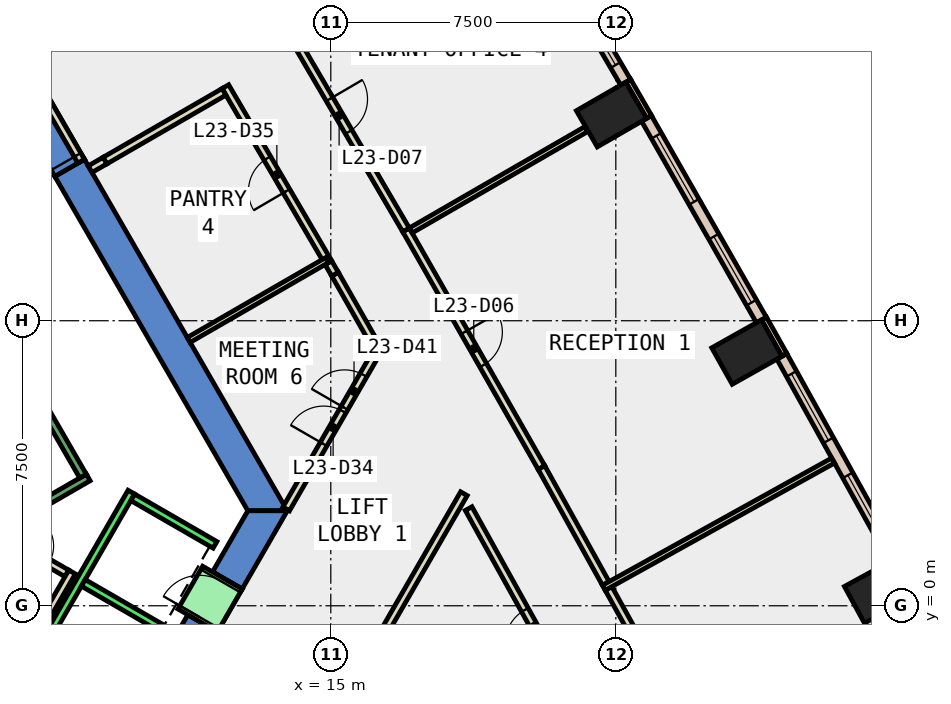
"""IFC4 building model, lengths in metres.
Left out: names, types, materials, properties, quantities, classifications, styles, units other than length and angle.
Written with IfcOpenShell. Run it as: python <this file> out.ifc"""

import sys

from ifc_helpers import new_model, si_unit, direction, frame, frame_2d, origin, origin_2d, place, context, subcontext, project, spatial, polyline, rectangle, outline, extrude, element, fill, save


model = new_model("IFC4")
c1 = context("Model", 3, precision=1e-05, world=origin(), true_north=direction((0.0, 1.0)))
c2 = subcontext(c1, "Body", "Model", "MODEL_VIEW")
j1 = project(units=[si_unit("LENGTHUNIT", "METRE"), si_unit("PLANEANGLEUNIT", "RADIAN")], contexts=[c1])
p1 = place(None, origin())
s1 = spatial("IfcSite", under=j1, at=p1, CompositionType="ELEMENT")
p2 = place(p1, origin())
s2 = spatial("IfcBuilding", under=s1, at=p2, CompositionType="ELEMENT")
p3 = place(p2, frame((0.0, 0.0, 107.6)))
s3 = spatial("IfcBuildingStorey", under=s2, at=p3, CompositionType="ELEMENT", Elevation=107.6)
for number, where, z_axis, x_axis in (
    (1, (29.438, 0.385, -0.4), (0.0, 0.0, 1.0), (-0.48, 0.877, 0.0)),
    (2, (25.948, 6.675, -0.4), (0.0, 0.0, 1.0), (-0.49, 0.872, 0.0)),
    (3, (22.387, 12.925, -0.4), (0.0, 0.0, 1.0), (-0.5, 0.866, 0.0)),
):
    element("IfcColumn", number, at=place(p3, frame(where, z_axis=z_axis, x_axis=x_axis)), inside=s3, PredefinedType="COLUMN", context=c2, shape_type="SweptSolid", body=[
        extrude(rectangle(XDim=1.1, YDim=1.5, at=origin_2d()), origin(), (0.0, 0.0, 1.0), 4.2),
    ])
p4 = place(p3, frame((0.0, 0.0, -0.4)))
e4 = element("IfcWall", 4, at=p4, inside=s3, PredefinedType="SHEAR", context=c2, shape_type="SweptSolid", body=[
    extrude(outline(polyline([(8.517, 11.748), (7.738, 11.298), (12.817, 2.5), (13.856, 2.5), (8.517, 11.748)])), origin(), (0.0, 0.0, 1.0), 4.2),
])
p5 = place(p3, frame((0.0, 0.0, 3.6)))
e5 = element("IfcWall", 5, at=p5, inside=s3, PredefinedType="SHEAR", context=c2, shape_type="SweptSolid", body=[
    extrude(outline(polyline([(7.517, 13.48), (6.738, 13.03), (7.738, 11.298), (8.517, 11.748), (7.517, 13.48)])), origin(), (0.0, 0.0, 1.0), 0.2),
])
p6 = place(p3, frame((0.0, 0.0, -0.4)))
e6 = element("IfcWall", 6, at=p6, inside=s3, PredefinedType="SHEAR", context=c2, shape_type="SweptSolid", body=[
    extrude(outline(polyline([(12.017, -0.686), (11.238, -0.236), (10.588, -1.361), (11.367, -1.811), (12.017, -0.686)])), origin(), (0.0, 0.0, 1.0), 4.2),
])
p7 = place(p3, frame((0.0, 0.0, -0.4)))
e7 = element("IfcWall", 7, at=p7, inside=s3, PredefinedType="SHEAR", context=c2, shape_type="SweptSolid", body=[
    extrude(outline(polyline([(11.888, 0.89), (12.667, 0.44), (13.856, 2.5), (12.817, 2.5), (11.888, 0.89)])), origin(), (0.0, 0.0, 1.0), 4.2),
])
p8 = place(p3, frame((0.0, 0.0, 3.6)))
e8 = element("IfcWall", 8, at=p8, inside=s3, PredefinedType="SHEAR", context=c2, shape_type="SweptSolid", body=[
    extrude(outline(polyline([(12.667, 0.44), (11.888, 0.89), (11.238, -0.236), (12.017, -0.686), (12.667, 0.44)])), origin(), (0.0, 0.0, 1.0), 0.2),
])
p9 = place(p3, frame((26.937, 6.6, 0.0), z_axis=(0.0, 0.0, 1.0), x_axis=(-0.490008344094, 0.871717742574, 0.0)))
e9 = element("IfcWall", 9, at=p9, inside=s3, PredefinedType="STANDARD", context=c2, shape_type="SweptSolid", body=[
    extrude(rectangle(XDim=1.1, YDim=0.15, at=frame_2d((0.55, 0.0))), origin(), (0.0, 0.0, 1.0), 3.8),
])
p10 = place(p3, frame((23.376, 12.861, 0.0), z_axis=(0.0, 0.0, 1.0), x_axis=(-0.499933745558, 0.866063652425, 0.0)))
e10 = element("IfcWall", 10, at=p10, inside=s3, PredefinedType="STANDARD", context=c2, shape_type="SweptSolid", body=[
    extrude(rectangle(XDim=1.1, YDim=0.15, at=frame_2d((0.55, 0.0))), origin(), (0.0, 0.0, 1.0), 3.8),
])
p11 = place(p3, frame((29.83, 1.225, 0.0), z_axis=(0.0, 0.0, 1.0), x_axis=(-0.485170774404, 0.874419418623, 0.0)))
e11 = element("IfcWall", 11, at=p11, inside=s3, PredefinedType="STANDARD", context=c2, shape_type="SweptSolid", body=[
    extrude(rectangle(XDim=6.103, YDim=0.3, at=frame_2d((3.052, 0.0))), origin(), (0.0, 0.0, 1.0), 3.8),
])
p12 = place(p11, frame((0.526, 0.0, 0.9)))
e12 = element("IfcOpeningElement", 12, at=p12, cuts=e11, PredefinedType="OPENING", context=c2, shape_type="SweptSolid", body=[
    extrude(rectangle(XDim=2.0, YDim=2.6, at=frame_2d((1.0, 1.3))), frame((0.0, 0.16, 0.0), z_axis=(0.0, -1.0, 0.0), x_axis=(1.0, 0.0, 0.0)), (0.0, 0.0, 1.0), 0.32),
])
p13 = place(p11, frame((3.578, 0.0, 0.9)))
e13 = element("IfcOpeningElement", 13, at=p13, cuts=e11, PredefinedType="OPENING", context=c2, shape_type="SweptSolid", body=[
    extrude(rectangle(XDim=2.0, YDim=2.6, at=frame_2d((1.0, 1.3))), frame((0.0, 0.16, 0.0), z_axis=(0.0, -1.0, 0.0), x_axis=(1.0, 0.0, 0.0)), (0.0, 0.0, 1.0), 0.32),
])
p14 = place(p3, frame((26.33, 7.52, 0.0), z_axis=(0.0, 0.0, 1.0), x_axis=(-0.495113375427, 0.868828375154, 0.0)))
e14 = element("IfcWall", 14, at=p14, inside=s3, PredefinedType="STANDARD", context=c2, shape_type="SweptSolid", body=[
    extrude(rectangle(XDim=6.104, YDim=0.3, at=frame_2d((3.052, 0.0))), origin(), (0.0, 0.0, 1.0), 3.8),
])
p15 = place(p14, frame((0.526, 0.0, 0.9)))
e15 = element("IfcOpeningElement", 15, at=p15, cuts=e14, PredefinedType="OPENING", context=c2, shape_type="SweptSolid", body=[
    extrude(rectangle(XDim=2.0, YDim=2.6, at=frame_2d((1.0, 1.3))), frame((0.0, 0.16, 0.0), z_axis=(0.0, -1.0, 0.0), x_axis=(1.0, 0.0, 0.0)), (0.0, 0.0, 1.0), 0.32),
])
p16 = place(p14, frame((3.578, 0.0, 0.9)))
e16 = element("IfcOpeningElement", 16, at=p16, cuts=e14, PredefinedType="OPENING", context=c2, shape_type="SweptSolid", body=[
    extrude(rectangle(XDim=2.0, YDim=2.6, at=frame_2d((1.0, 1.3))), frame((0.0, 0.16, 0.0), z_axis=(0.0, -1.0, 0.0), x_axis=(1.0, 0.0, 0.0)), (0.0, 0.0, 1.0), 0.32),
])
p17 = place(p3, frame((22.759, 13.774, 0.0), z_axis=(0.0, 0.0, 1.0), x_axis=(-0.50490018297, 0.863177736759, 0.0)))
e17 = element("IfcWall", 17, at=p17, inside=s3, PredefinedType="STANDARD", context=c2, shape_type="SweptSolid", body=[
    extrude(rectangle(XDim=6.104, YDim=0.3, at=frame_2d((3.052, 0.0))), origin(), (0.0, 0.0, 1.0), 3.8),
])
p18 = place(p17, frame((0.526, 0.0, 0.9)))
e18 = element("IfcOpeningElement", 18, at=p18, cuts=e17, PredefinedType="OPENING", context=c2, shape_type="SweptSolid", body=[
    extrude(rectangle(XDim=2.0, YDim=2.6, at=frame_2d((1.0, 1.3))), frame((0.0, 0.16, 0.0), z_axis=(0.0, -1.0, 0.0), x_axis=(1.0, 0.0, 0.0)), (0.0, 0.0, 1.0), 0.32),
])
p19 = place(p17, frame((3.578, 0.0, 0.9)))
e19 = element("IfcOpeningElement", 19, at=p19, cuts=e17, PredefinedType="OPENING", context=c2, shape_type="SweptSolid", body=[
    extrude(rectangle(XDim=2.0, YDim=2.6, at=frame_2d((1.0, 1.3))), frame((0.0, 0.16, 0.0), z_axis=(0.0, -1.0, 0.0), x_axis=(1.0, 0.0, 0.0)), (0.0, 0.0, 1.0), 0.32),
])
p20 = place(p3, frame((16.195, 6.824, 0.0), z_axis=(0.0, 0.0, 1.0), x_axis=(-0.494984897559, 0.868901577388, 0.0)))
e20 = element("IfcWall", 20, at=p20, inside=s3, PredefinedType="PARTITIONING", context=c2, shape_type="SweptSolid", body=[
    extrude(rectangle(XDim=2.188, YDim=0.2, at=frame_2d((1.094, 0.0))), origin(), (0.0, 0.0, 1.0), 3.8),
])
p21 = place(p3, frame((15.112, 8.725, 0.0), z_axis=(0.0, 0.0, 1.0), x_axis=(-0.50443330283, 0.86345066043, 0.0)))
e21 = element("IfcWall", 21, at=p21, inside=s3, PredefinedType="PARTITIONING", context=c2, shape_type="SweptSolid", body=[
    extrude(rectangle(XDim=0.351, YDim=0.2, at=frame_2d((0.175, 0.0))), origin(), (0.0, 0.0, 1.0), 3.8),
])
p22 = place(p3, frame((14.935, 9.028, 0.0), z_axis=(0.0, 0.0, 1.0), x_axis=(-0.504934493304, 0.863157666636, 0.0)))
e22 = element("IfcWall", 22, at=p22, inside=s3, PredefinedType="PARTITIONING", context=c2, shape_type="SweptSolid", body=[
    extrude(rectangle(XDim=5.365, YDim=0.2, at=frame_2d((2.683, 0.0))), origin(), (0.0, 0.0, 1.0), 3.8),
])
p23 = place(p22, frame((2.182, 0.0, 0.0)))
e23 = element("IfcOpeningElement", 23, at=p23, cuts=e22, PredefinedType="OPENING", context=c2, shape_type="SweptSolid", body=[
    extrude(rectangle(XDim=1.0, YDim=2.1, at=frame_2d((0.5, 1.05))), frame((0.0, 0.11, 0.0), z_axis=(0.0, -1.0, 0.0), x_axis=(1.0, 0.0, 0.0)), (0.0, 0.0, 1.0), 0.22),
])
p24 = place(p3, frame((12.19, 13.522, 0.0), z_axis=(0.0, 0.0, 1.0), x_axis=(-0.866000156139, -0.500043727655, 0.0)))
e24 = element("IfcWall", 24, at=p24, inside=s3, PredefinedType="PARTITIONING", context=c2, shape_type="SweptSolid", body=[
    extrude(rectangle(XDim=3.618, YDim=0.2, at=frame_2d((1.809, 0.0))), origin(), (0.0, 0.0, 1.0), 3.8),
])
p25 = place(p3, frame((22.071, -3.65, 0.0), z_axis=(0.0, 0.0, 1.0), x_axis=(-0.485198988697, 0.874403763354, 0.0)))
e25 = element("IfcWall", 25, at=p25, inside=s3, PredefinedType="PARTITIONING", context=c2, shape_type="SweptSolid", body=[
    extrude(rectangle(XDim=7.098, YDim=0.2, at=frame_2d((3.549, 0.0))), origin(), (0.0, 0.0, 1.0), 3.8),
])
p26 = place(p25, frame((3.049, 0.0, 0.0)))
e26 = element("IfcOpeningElement", 26, at=p26, cuts=e25, PredefinedType="OPENING", context=c2, shape_type="SweptSolid", body=[
    extrude(rectangle(XDim=1.0, YDim=2.1, at=frame_2d((0.5, 1.05))), frame((0.0, 0.11, 0.0), z_axis=(0.0, -1.0, 0.0), x_axis=(1.0, 0.0, 0.0)), (0.0, 0.0, 1.0), 0.22),
])
p27 = place(p3, frame((22.309, 0.456, 0.0), z_axis=(0.0, 0.0, 1.0), x_axis=(0.484982854201, -0.87452365956, 0.0)))
e27 = element("IfcWall", 27, at=p27, inside=s3, PredefinedType="PARTITIONING", context=c2, shape_type="SweptSolid", body=[
    extrude(rectangle(XDim=3.487, YDim=0.2, at=frame_2d((1.743, 0.0))), origin(), (0.0, 0.0, 1.0), 3.8),
])
p28 = place(p3, frame((16.98, 9.89, 0.0), z_axis=(0.0, 0.0, 1.0), x_axis=(0.495123170501, -0.868822793228, 0.0)))
e28 = element("IfcWall", 28, at=p28, inside=s3, PredefinedType="PARTITIONING", context=c2, shape_type="SweptSolid", body=[
    extrude(rectangle(XDim=7.198, YDim=0.2, at=frame_2d((3.599, 0.0))), origin(), (0.0, 0.0, 1.0), 3.8),
])
p29 = place(p28, frame((3.099, 0.0, 0.0)))
e29 = element("IfcOpeningElement", 29, at=p29, cuts=e28, PredefinedType="OPENING", context=c2, shape_type="SweptSolid", body=[
    extrude(rectangle(XDim=1.0, YDim=2.1, at=frame_2d((0.5, 1.05))), frame((0.0, 0.11, 0.0), z_axis=(0.0, -1.0, 0.0), x_axis=(1.0, 0.0, 0.0)), (0.0, 0.0, 1.0), 0.22),
])
p30 = place(p3, frame((20.544, 3.636, 0.0), z_axis=(0.0, 0.0, 1.0), x_axis=(0.485250552989, -0.874375148792, 0.0)))
e30 = element("IfcWall", 30, at=p30, inside=s3, PredefinedType="PARTITIONING", context=c2, shape_type="SweptSolid", body=[
    extrude(rectangle(XDim=3.487, YDim=0.2, at=frame_2d((1.744, 0.0))), origin(), (0.0, 0.0, 1.0), 3.8),
])
p31 = place(p3, frame((13.383, 16.039, 0.0), z_axis=(0.0, 0.0, 1.0), x_axis=(0.504806221623, -0.863232690884, 0.0)))
e31 = element("IfcWall", 31, at=p31, inside=s3, PredefinedType="PARTITIONING", context=c2, shape_type="SweptSolid", body=[
    extrude(rectangle(XDim=7.124, YDim=0.2, at=frame_2d((3.562, 0.0))), origin(), (0.0, 0.0, 1.0), 3.8),
])
p32 = place(p31, frame((3.137, 0.0, 0.0)))
e32 = element("IfcOpeningElement", 32, at=p32, cuts=e31, PredefinedType="OPENING", context=c2, shape_type="SweptSolid", body=[
    extrude(rectangle(XDim=1.0, YDim=2.1, at=frame_2d((0.5, 1.05))), frame((0.0, 0.11, 0.0), z_axis=(0.0, -1.0, 0.0), x_axis=(1.0, 0.0, 0.0)), (0.0, 0.0, 1.0), 0.22),
])
p33 = place(p3, frame((6.25, 1.894, 0.0), z_axis=(0.0, 0.0, 1.0), x_axis=(0.866043184279, -0.499969202016, 0.0)))
e33 = element("IfcWall", 33, at=p33, inside=s3, PredefinedType="PARTITIONING", context=c2, shape_type="SweptSolid", body=[
    extrude(rectangle(XDim=2.084, YDim=0.2, at=frame_2d((1.042, 0.0))), origin(), (0.0, 0.0, 1.0), 3.8),
])
p34 = place(p33, frame((0.642, 0.0, 0.0)))
e34 = element("IfcOpeningElement", 34, at=p34, cuts=e33, PredefinedType="OPENING", context=c2, shape_type="SweptSolid", body=[
    extrude(rectangle(XDim=0.9, YDim=2.1, at=frame_2d((0.45, 1.05))), frame((0.0, 0.11, 0.0), z_axis=(0.0, -1.0, 0.0), x_axis=(1.0, 0.0, 0.0)), (0.0, 0.0, 1.0), 0.22),
])
p35 = place(p3, frame((8.192, 0.888, 0.0), z_axis=(0.0, 0.0, 1.0), x_axis=(-0.499940625693, -0.866059680843, 0.0)))
e35 = element("IfcWall", 35, at=p35, inside=s3, PredefinedType="PARTITIONING", context=c2, shape_type="SweptSolid", body=[
    extrude(rectangle(XDim=2.68, YDim=0.2, at=frame_2d((1.34, 0.0))), origin(), (0.0, 0.0, 1.0), 3.8),
])
p36 = place(p3, frame((11.261, 6.994, 0.0), z_axis=(0.0, 0.0, 1.0), x_axis=(0.866037428454, 0.499979172084, 0.0)))
e36 = element("IfcWall", 36, at=p36, inside=s3, PredefinedType="PARTITIONING", context=c2, shape_type="SweptSolid", body=[
    extrude(rectangle(XDim=4.198, YDim=0.15, at=frame_2d((2.099, 0.0))), origin(), (0.0, 0.0, 1.0), 3.8),
])
p37 = place(p3, frame((13.827, 2.55, 0.0), z_axis=(0.0, 0.0, 1.0), x_axis=(0.500070719615, 0.865984569946, 0.0)))
e37 = element("IfcWall", 37, at=p37, inside=s3, PredefinedType="PARTITIONING", context=c2, shape_type="SweptSolid", body=[
    extrude(rectangle(XDim=4.935, YDim=0.2, at=frame_2d((2.468, 0.0))), origin(), (0.0, 0.0, 1.0), 3.8),
])
p38 = place(p37, frame((1.968, 0.0, 0.0)))
e38 = element("IfcOpeningElement", 38, at=p38, cuts=e37, PredefinedType="OPENING", context=c2, shape_type="SweptSolid", body=[
    extrude(rectangle(XDim=1.0, YDim=2.1, at=frame_2d((0.5, 1.05))), frame((0.0, 0.11, 0.0), z_axis=(0.0, -1.0, 0.0), x_axis=(1.0, 0.0, 0.0)), (0.0, 0.0, 1.0), 0.22),
])
p39 = place(p37, frame((3.068, 0.0, 0.0)))
e39 = element("IfcOpeningElement", 39, at=p39, cuts=e37, PredefinedType="OPENING", context=c2, shape_type="SweptSolid", body=[
    extrude(rectangle(XDim=1.0, YDim=2.1, at=frame_2d((0.5, 1.05))), frame((0.0, 0.11, 0.0), z_axis=(0.0, -1.0, 0.0), x_axis=(1.0, 0.0, 0.0)), (0.0, 0.0, 1.0), 0.22),
])
p40 = place(p3, frame((18.503, 2.949, 0.0), z_axis=(0.0, 0.0, 1.0), x_axis=(-0.49997390151, -0.86604047123, 0.0)))
e40 = element("IfcWall", 40, at=p40, inside=s3, PredefinedType="PARTITIONING", context=c2, shape_type="SweptSolid", body=[
    extrude(rectangle(XDim=11.626, YDim=0.2, at=frame_2d((5.813, 0.0))), origin(), (0.0, 0.0, 1.0), 3.8),
])
p41 = place(p3, frame((22.185, 0.473, 0.0), z_axis=(0.0, 0.0, 1.0), x_axis=(0.874372498137, 0.485255329184, 0.0)))
e41 = element("IfcWall", 41, at=p41, inside=s3, PredefinedType="PARTITIONING", context=c2, shape_type="SweptSolid", body=[
    extrude(rectangle(XDim=6.9, YDim=0.15, at=frame_2d((3.45, 0.0))), origin(), (0.0, 0.0, 1.0), 3.8),
])
p42 = place(p3, frame((17.104, 9.875, 0.0), z_axis=(0.0, 0.0, 1.0), x_axis=(0.866024640963, 0.500001321243, 0.0)))
e42 = element("IfcWall", 42, at=p42, inside=s3, PredefinedType="PARTITIONING", context=c2, shape_type="SweptSolid", body=[
    extrude(rectangle(XDim=5.33, YDim=0.15, at=frame_2d((2.665, 0.0))), origin(), (0.0, 0.0, 1.0), 3.8),
])
p43 = place(p3, frame((8.43, 11.698, 0.0), z_axis=(0.0, 0.0, 1.0), x_axis=(-0.50002537861, 0.866010750942, 0.0)))
e43 = element("IfcWall", 43, at=p43, inside=s3, PredefinedType="PARTITIONING", context=c2, shape_type="SweptSolid", body=[
    extrude(rectangle(XDim=2.0, YDim=0.2, at=frame_2d((1.0, 0.0))), origin(), (0.0, 0.0, 1.0), 2.4),
])
p44 = place(p43, frame((0.19, 0.0, 0.0)))
e44 = element("IfcOpeningElement", 44, at=p44, cuts=e43, PredefinedType="OPENING", context=c2, shape_type="SweptSolid", body=[
    extrude(rectangle(XDim=1.8, YDim=2.1, at=frame_2d((0.9, 1.05))), frame((0.0, 0.11, 0.0), z_axis=(0.0, -1.0, 0.0), x_axis=(1.0, 0.0, 0.0)), (0.0, 0.0, 1.0), 0.22),
])
p45 = place(p3, frame((9.057, 11.713, 0.0), z_axis=(0.0, 0.0, 1.0), x_axis=(-0.866266849364, -0.49958157061, 0.0)))
e45 = element("IfcWall", 45, at=p45, inside=s3, PredefinedType="PARTITIONING", context=c2, shape_type="SweptSolid", body=[
    extrude(rectangle(XDim=0.45, YDim=0.2, at=frame_2d((0.225, 0.0))), origin(), (0.0, 0.0, 1.0), 2.4),
])
p46 = place(p3, frame((4.451, -6.19, 0.0), z_axis=(0.0, 0.0, 1.0), x_axis=(0.50000090737, 0.866024879913, 0.0)))
e46 = element("IfcWall", 46, at=p46, inside=s3, PredefinedType="STANDARD", context=c2, shape_type="SweptSolid", body=[
    extrude(rectangle(XDim=10.6, YDim=0.2, at=frame_2d((5.3, 0.0))), origin(), (0.0, 0.0, 1.0), 3.8),
])
p47 = place(p3, frame((8.488, 0.602, 0.0), z_axis=(0.0, 0.0, 1.0), x_axis=(0.866022959057, -0.500004234368, 0.0)))
e47 = element("IfcWall", 47, at=p47, inside=s3, PredefinedType="STANDARD", context=c2, shape_type="SweptSolid", body=[
    extrude(rectangle(XDim=2.5, YDim=0.2, at=frame_2d((1.25, 0.0))), origin(), (0.0, 0.0, 1.0), 3.8),
])
p48 = place(p3, frame((9.788, 2.853, 0.0), z_axis=(0.0, 0.0, 1.0), x_axis=(0.865998541277, -0.500046524342, 0.0)))
e48 = element("IfcWall", 48, at=p48, inside=s3, PredefinedType="STANDARD", context=c2, shape_type="SweptSolid", body=[
    extrude(rectangle(XDim=2.5, YDim=0.2, at=frame_2d((1.25, 0.0))), origin(), (0.0, 0.0, 1.0), 3.8),
])
p49 = place(p3, frame((11.498, -0.385, 0.0), z_axis=(0.0, 0.0, 1.0), x_axis=(0.500221244143, 0.865897630733, 0.0)))
e49 = element("IfcWall", 49, at=p49, inside=s3, PredefinedType="STANDARD", context=c2, shape_type="SweptSolid", body=[
    extrude(rectangle(XDim=1.299, YDim=1.2, at=frame_2d((0.65, 0.0))), origin(), (0.0, 0.0, 1.0), 2.4),
])
p50 = place(p49, frame((0.1, 0.0, 0.0)))
e50 = element("IfcOpeningElement", 50, at=p50, cuts=e49, PredefinedType="OPENING", context=c2, shape_type="SweptSolid", body=[
    extrude(rectangle(XDim=1.1, YDim=2.3, at=frame_2d((0.55, 1.15))), frame((0.0, 0.61, 0.0), z_axis=(0.0, -1.0, 0.0), x_axis=(1.0, 0.0, 0.0)), (0.0, 0.0, 1.0), 1.22),
])
p51 = place(p3, frame((4.806, 1.176, 0.0), z_axis=(0.0, 0.0, 1.0), x_axis=(0.866059941101, 0.499940174841, 0.0)))
e51 = element("IfcWall", 51, at=p51, inside=s3, PredefinedType="STANDARD", context=c2, shape_type="SweptSolid", body=[
    extrude(rectangle(XDim=4.4, YDim=0.2, at=frame_2d((2.2, 0.0))), origin(), (0.0, 0.0, 1.0), 3.8),
])
p52 = place(p51, frame((1.65, 0.0, 0.0)))
e52 = element("IfcOpeningElement", 52, at=p52, cuts=e51, PredefinedType="OPENING", context=c2, shape_type="SweptSolid", body=[
    extrude(rectangle(XDim=1.1, YDim=2.2, at=frame_2d((0.55, 1.1))), frame((0.0, 0.11, 0.0), z_axis=(0.0, -1.0, 0.0), x_axis=(1.0, 0.0, 0.0)), (0.0, 0.0, 1.0), 0.22),
])
p53 = place(p3, frame((8.48, 3.412, 0.0), z_axis=(0.0, 0.0, 1.0), x_axis=(-0.499978703459, 0.866037698999, 0.0)))
e53 = element("IfcWall", 53, at=p53, inside=s3, PredefinedType="STANDARD", context=c2, shape_type="SweptSolid", body=[
    extrude(rectangle(XDim=6.9, YDim=0.2, at=frame_2d((3.45, 0.0))), origin(), (0.0, 0.0, 1.0), 3.8),
])
p54 = place(p12, origin())
e54 = element("IfcWindow", 54, at=p54, inside=s3, PartitioningType="SINGLE_PANEL", PredefinedType="WINDOW", context=c2, shape_type="SweptSolid", body=[
    extrude(rectangle(XDim=2.0, YDim=2.6, at=frame_2d((1.0, 1.3))), frame((0.0, 0.03, 0.0), z_axis=(0.0, -1.0, 0.0), x_axis=(1.0, 0.0, 0.0)), (0.0, 0.0, 1.0), 0.06),
])
fill(e12, e54)
p55 = place(p13, origin())
e55 = element("IfcWindow", 55, at=p55, inside=s3, PartitioningType="SINGLE_PANEL", PredefinedType="WINDOW", context=c2, shape_type="SweptSolid", body=[
    extrude(rectangle(XDim=2.0, YDim=2.6, at=frame_2d((1.0, 1.3))), frame((0.0, 0.03, 0.0), z_axis=(0.0, -1.0, 0.0), x_axis=(1.0, 0.0, 0.0)), (0.0, 0.0, 1.0), 0.06),
])
fill(e13, e55)
p56 = place(p15, origin())
e56 = element("IfcWindow", 56, at=p56, inside=s3, PartitioningType="SINGLE_PANEL", PredefinedType="WINDOW", context=c2, shape_type="SweptSolid", body=[
    extrude(rectangle(XDim=2.0, YDim=2.6, at=frame_2d((1.0, 1.3))), frame((0.0, 0.03, 0.0), z_axis=(0.0, -1.0, 0.0), x_axis=(1.0, 0.0, 0.0)), (0.0, 0.0, 1.0), 0.06),
])
fill(e15, e56)
p57 = place(p16, origin())
e57 = element("IfcWindow", 57, at=p57, inside=s3, PartitioningType="SINGLE_PANEL", PredefinedType="WINDOW", context=c2, shape_type="SweptSolid", body=[
    extrude(rectangle(XDim=2.0, YDim=2.6, at=frame_2d((1.0, 1.3))), frame((0.0, 0.03, 0.0), z_axis=(0.0, -1.0, 0.0), x_axis=(1.0, 0.0, 0.0)), (0.0, 0.0, 1.0), 0.06),
])
fill(e16, e57)
p58 = place(p18, origin())
e58 = element("IfcWindow", 58, at=p58, inside=s3, PartitioningType="SINGLE_PANEL", PredefinedType="WINDOW", context=c2, shape_type="SweptSolid", body=[
    extrude(rectangle(XDim=2.0, YDim=2.6, at=frame_2d((1.0, 1.3))), frame((0.0, 0.03, 0.0), z_axis=(0.0, -1.0, 0.0), x_axis=(1.0, 0.0, 0.0)), (0.0, 0.0, 1.0), 0.06),
])
fill(e18, e58)
p59 = place(p29, origin())
e59 = element("IfcDoor", 59, at=p59, inside=s3, OperationType="SINGLE_SWING_LEFT", PredefinedType="DOOR", context=c2, shape_type="SweptSolid", body=[
    extrude(rectangle(XDim=1.0, YDim=2.1, at=frame_2d((0.5, 1.05))), frame((0.0, 0.025, 0.0), z_axis=(0.0, -1.0, 0.0), x_axis=(1.0, 0.0, 0.0)), (0.0, 0.0, 1.0), 0.05),
])
fill(e29, e59)
p60 = place(p32, origin())
e60 = element("IfcDoor", 60, at=p60, inside=s3, OperationType="SINGLE_SWING_LEFT", PredefinedType="DOOR", context=c2, shape_type="SweptSolid", body=[
    extrude(rectangle(XDim=1.0, YDim=2.1, at=frame_2d((0.5, 1.05))), frame((0.0, 0.025, 0.0), z_axis=(0.0, -1.0, 0.0), x_axis=(1.0, 0.0, 0.0)), (0.0, 0.0, 1.0), 0.05),
])
fill(e32, e60)
p61 = place(p26, origin())
e61 = element("IfcDoor", 61, at=p61, inside=s3, OperationType="SINGLE_SWING_RIGHT", PredefinedType="DOOR", context=c2, shape_type="SweptSolid", body=[
    extrude(rectangle(XDim=1.0, YDim=2.1, at=frame_2d((0.5, 1.05))), frame((0.0, 0.025, 0.0), z_axis=(0.0, -1.0, 0.0), x_axis=(1.0, 0.0, 0.0)), (0.0, 0.0, 1.0), 0.05),
])
fill(e26, e61)
p62 = place(p38, origin())
e62 = element("IfcDoor", 62, at=p62, inside=s3, OperationType="SINGLE_SWING_LEFT", PredefinedType="DOOR", context=c2, shape_type="SweptSolid", body=[
    extrude(rectangle(XDim=1.0, YDim=2.1, at=frame_2d((0.5, 1.05))), frame((0.0, 0.025, 0.0), z_axis=(0.0, -1.0, 0.0), x_axis=(1.0, 0.0, 0.0)), (0.0, 0.0, 1.0), 0.05),
])
fill(e38, e62)
p63 = place(p23, origin())
e63 = element("IfcDoor", 63, at=p63, inside=s3, OperationType="SINGLE_SWING_LEFT", PredefinedType="DOOR", context=c2, shape_type="SweptSolid", body=[
    extrude(rectangle(XDim=1.0, YDim=2.1, at=frame_2d((0.5, 1.05))), frame((0.0, 0.025, 0.0), z_axis=(0.0, -1.0, 0.0), x_axis=(1.0, 0.0, 0.0)), (0.0, 0.0, 1.0), 0.05),
])
fill(e23, e63)
p64 = place(p39, origin())
e64 = element("IfcDoor", 64, at=p64, inside=s3, OperationType="SINGLE_SWING_RIGHT", PredefinedType="DOOR", context=c2, shape_type="SweptSolid", body=[
    extrude(rectangle(XDim=1.0, YDim=2.1, at=frame_2d((0.5, 1.05))), frame((0.0, 0.025, 0.0), z_axis=(0.0, -1.0, 0.0), x_axis=(1.0, 0.0, 0.0)), (0.0, 0.0, 1.0), 0.05),
])
fill(e39, e64)
p65 = place(p44, origin())
e65 = element("IfcDoor", 65, at=p65, inside=s3, OperationType="DOUBLE_DOOR_SINGLE_SWING", PredefinedType="DOOR", context=c2, shape_type="SweptSolid", body=[
    extrude(rectangle(XDim=1.8, YDim=2.1, at=frame_2d((0.9, 1.05))), frame((0.0, 0.025, 0.0), z_axis=(0.0, -1.0, 0.0), x_axis=(1.0, 0.0, 0.0)), (0.0, 0.0, 1.0), 0.05),
])
fill(e44, e65)
p66 = place(p50, origin())
e66 = element("IfcDoor", 66, at=p66, inside=s3, OperationType="SLIDING_TO_LEFT", PredefinedType="DOOR", context=c2, shape_type="SweptSolid", body=[
    extrude(rectangle(XDim=1.1, YDim=2.3, at=frame_2d((0.55, 1.15))), frame((0.0, 0.025, 0.0), z_axis=(0.0, -1.0, 0.0), x_axis=(1.0, 0.0, 0.0)), (0.0, 0.0, 1.0), 0.05),
])
fill(e50, e66)
save(model, sys.argv[1])
